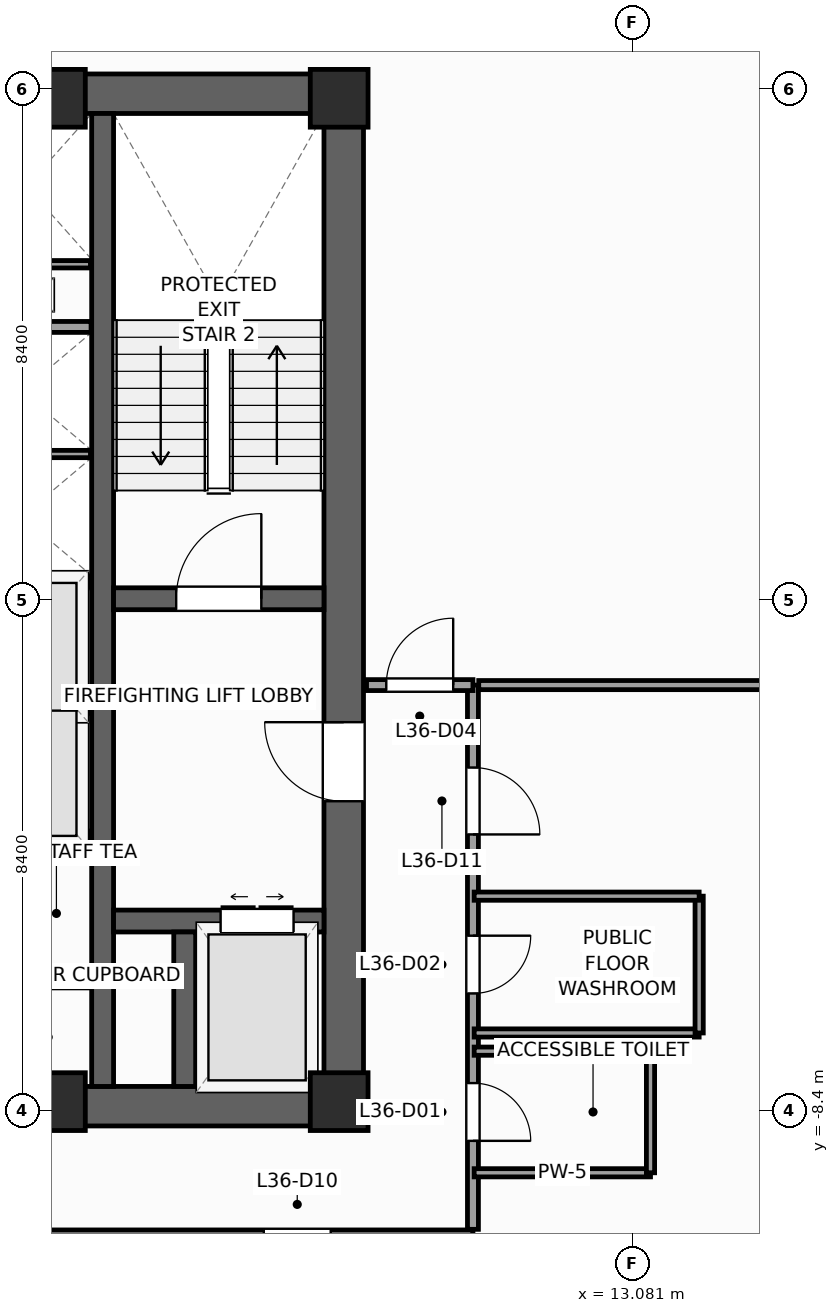
"""IFC4 building model, lengths in metres.
Left out: names, types, materials, properties, quantities, classifications, styles, units other than length and angle.
Written with IfcOpenShell. Run it as: python <this file> out.ifc"""

import sys

from ifc_helpers import new_model, si_unit, direction, frame, frame_2d, origin, origin_2d, place, context, subcontext, project, spatial, rectangle, extrude, source, transform, mapped, element, fill, save


model = new_model("IFC4")
c1 = context("Model", 3, precision=1e-05, world=origin(), true_north=direction((0.0, 1.0)))
c2 = subcontext(c1, "Body", "Model", "MODEL_VIEW")
j1 = project(units=[si_unit("LENGTHUNIT", "METRE"), si_unit("PLANEANGLEUNIT", "RADIAN")], contexts=[c1])
p1 = place(None, origin())
s1 = spatial("IfcSite", under=j1, at=p1, CompositionType="ELEMENT")
p2 = place(p1, origin())
s2 = spatial("IfcBuilding", under=s1, at=p2, CompositionType="ELEMENT")
p3 = place(p2, frame((0.0, 0.0, 152.4)))
s3 = spatial("IfcBuildingStorey", under=s2, at=p3, CompositionType="ELEMENT", Elevation=152.4)
p4 = place(p3, frame((-8.65, -8.325, 0.0), z_axis=(0.0, 0.0, 1.0), x_axis=(1.0, 0.0, 0.0)))
e1 = element("IfcWall", 1, at=p4, inside=s3, PredefinedType="SHEAR", context=c2, shape_type="SweptSolid", body=[
    extrude(rectangle(XDim=17.3, YDim=0.65, at=frame_2d((8.65, 0.0))), origin(), (0.0, 0.0, 1.0), 4.0),
])
p5 = place(p4, frame((8.0, 0.0, 0.0)))
e2 = element("IfcOpeningElement", 2, at=p5, cuts=e1, PredefinedType="OPENING", context=c2, shape_type="SweptSolid", body=[
    extrude(rectangle(XDim=1.3, YDim=2.2, at=frame_2d((0.65, 1.1))), frame((0.0, 0.335, 0.0), z_axis=(0.0, -1.0, 0.0), x_axis=(1.0, 0.0, 0.0)), (0.0, 0.0, 1.0), 0.67),
])
p6 = place(p3, frame((-8.65, 8.325, 0.0), z_axis=(0.0, 0.0, 1.0), x_axis=(1.0, 0.0, 0.0)))
e3 = element("IfcWall", 3, at=p6, inside=s3, PredefinedType="SHEAR", context=c2, shape_type="SweptSolid", body=[
    extrude(rectangle(XDim=17.3, YDim=0.65, at=frame_2d((8.65, 0.0))), origin(), (0.0, 0.0, 1.0), 4.0),
])
p7 = place(p3, frame((8.325, -8.0, 0.0), z_axis=(0.0, 0.0, 1.0), x_axis=(0.0, 1.0, 0.0)))
e4 = element("IfcWall", 4, at=p7, inside=s3, PredefinedType="SHEAR", context=c2, shape_type="SweptSolid", body=[
    extrude(rectangle(XDim=16.0, YDim=0.65, at=frame_2d((8.0, 0.0))), origin(), (0.0, 0.0, 1.0), 4.0),
])
p8 = place(p7, frame((4.69, 0.0, 0.0)))
e5 = element("IfcOpeningElement", 5, at=p8, cuts=e4, PredefinedType="OPENING", context=c2, shape_type="SweptSolid", body=[
    extrude(rectangle(XDim=1.3, YDim=2.2, at=frame_2d((0.65, 1.1))), frame((0.0, 0.335, 0.0), z_axis=(0.0, -1.0, 0.0), x_axis=(1.0, 0.0, 0.0)), (0.0, 0.0, 1.0), 0.67),
])
p9 = place(p3, frame((4.36, -8.0, 0.0), z_axis=(0.0, 0.0, 1.0), x_axis=(0.0, 1.0, 0.0)))
e6 = element("IfcWall", 6, at=p9, inside=s3, PredefinedType="SHEAR", context=c2, shape_type="SweptSolid", body=[
    extrude(rectangle(XDim=16.0, YDim=0.36, at=frame_2d((8.0, 0.0))), origin(), (0.0, 0.0, 1.0), 4.0),
])
p10 = place(p3, frame((4.54, 0.02, 0.0), z_axis=(0.0, 0.0, 1.0), x_axis=(1.0, 0.0, 0.0)))
e7 = element("IfcWall", 7, at=p10, inside=s3, PredefinedType="SHEAR", context=c2, shape_type="SweptSolid", body=[
    extrude(rectangle(XDim=3.46, YDim=0.36, at=frame_2d((1.73, 0.0))), origin(), (0.0, 0.0, 1.0), 4.0),
])
p11 = place(p10, frame((1.03, 0.0, 0.0)))
e8 = element("IfcOpeningElement", 8, at=p11, cuts=e7, PredefinedType="OPENING", context=c2, shape_type="SweptSolid", body=[
    extrude(rectangle(XDim=1.4, YDim=2.2, at=frame_2d((0.7, 1.1))), frame((0.0, 0.19, 0.0), z_axis=(0.0, -1.0, 0.0), x_axis=(1.0, 0.0, 0.0)), (0.0, 0.0, 1.0), 0.38),
])
p12 = place(p3, frame((4.54, -5.28, 0.0), z_axis=(0.0, 0.0, 1.0), x_axis=(1.0, 0.0, 0.0)))
e9 = element("IfcWall", 9, at=p12, inside=s3, PredefinedType="SHEAR", context=c2, shape_type="SweptSolid", body=[
    extrude(rectangle(XDim=3.46, YDim=0.36, at=frame_2d((1.73, 0.0))), origin(), (0.0, 0.0, 1.0), 4.0),
])
p13 = place(p12, frame((1.76, 0.0, 0.0)))
e10 = element("IfcOpeningElement", 10, at=p13, cuts=e9, PredefinedType="OPENING", context=c2, shape_type="SweptSolid", body=[
    extrude(rectangle(XDim=1.2, YDim=2.25, at=frame_2d((0.6, 1.125))), frame((0.0, 0.19, 0.0), z_axis=(0.0, -1.0, 0.0), x_axis=(1.0, 0.0, 0.0)), (0.0, 0.0, 1.0), 0.38),
])
p14 = place(p3, frame((5.71, -8.0, 0.0), z_axis=(0.0, 0.0, 1.0), x_axis=(0.0, 1.0, 0.0)))
e11 = element("IfcWall", 11, at=p14, inside=s3, PredefinedType="SHEAR", context=c2, shape_type="SweptSolid", body=[
    extrude(rectangle(XDim=2.54, YDim=0.36, at=frame_2d((1.27, 0.0))), origin(), (0.0, 0.0, 1.0), 4.0),
])
m1 = source(origin(), c2, "Body", "SweptSolid", [
    extrude(rectangle(XDim=0.95, YDim=0.95, at=origin_2d()), origin(), (0.0, 0.0, 1.0), 4.0),
])
for number, where, z_axis, x_axis in (
    (12, (8.25, -8.25, 0.0), (0.0, 0.0, 1.0), (1.0, 0.0, 0.0)),
    (13, (8.25, 8.25, 0.0), (0.0, 0.0, 1.0), (1.0, 0.0, 0.0)),
    (14, (3.6, -8.25, 0.0), (0.0, 0.0, 1.0), (1.0, 0.0, 0.0)),
    (15, (3.6, 8.25, 0.0), (0.0, 0.0, 1.0), (1.0, 0.0, 0.0)),
):
    element("IfcColumn", number, at=place(p3, frame(where, z_axis=z_axis, x_axis=x_axis)), inside=s3, PredefinedType="PILASTER", context=c2, shape_type="MappedRepresentation", body=[
        mapped(m1, transform((0.0, 0.0, 0.0), scale=1.0)),
    ])
p15 = place(p3, frame((-2.972, -32.558, 0.0), z_axis=(0.0, 0.0, 1.0), x_axis=(0.829036218961, 0.559194910251, 0.0)))
e16 = element("IfcWall", 16, at=p15, inside=s3, PredefinedType="STANDARD", context=c2, shape_type="SweptSolid", body=[
    extrude(rectangle(XDim=41.34, YDim=0.34, at=frame_2d((20.67, 0.0))), origin(), (0.0, 0.0, 1.0), 3.04),
])
p16 = place(p15, frame((14.545, 0.0, 0.0)))
e17 = element("IfcOpeningElement", 17, at=p16, cuts=e16, PredefinedType="OPENING", context=c2, shape_type="SweptSolid", body=[
    extrude(rectangle(XDim=1.05, YDim=2.25, at=frame_2d((0.525, 1.125))), frame((0.0, 0.18, 0.0), z_axis=(0.0, -1.0, 0.0), x_axis=(1.0, 0.0, 0.0)), (0.0, 0.0, 1.0), 0.36),
])
p17 = place(p15, frame((4.261, 0.0, 0.56)))
e18 = element("IfcOpeningElement", 18, at=p17, cuts=e16, PredefinedType="OPENING", context=c2, shape_type="SweptSolid", body=[
    extrude(rectangle(XDim=1.4, YDim=2.4, at=frame_2d((0.7, 1.2))), frame((0.0, 0.18, 0.0), z_axis=(0.0, -1.0, 0.0), x_axis=(1.0, 0.0, 0.0)), (0.0, 0.0, 1.0), 0.36),
])
p18 = place(p15, frame((11.064, 0.0, 0.61)))
e19 = element("IfcOpeningElement", 19, at=p18, cuts=e16, PredefinedType="OPENING", context=c2, shape_type="SweptSolid", body=[
    extrude(rectangle(XDim=1.85, YDim=2.35, at=frame_2d((0.925, 1.175))), frame((0.0, 0.18, 0.0), z_axis=(0.0, -1.0, 0.0), x_axis=(1.0, 0.0, 0.0)), (0.0, 0.0, 1.0), 0.36),
])
p19 = place(p15, frame((18.168, 0.0, 0.61)))
e20 = element("IfcOpeningElement", 20, at=p19, cuts=e16, PredefinedType="OPENING", context=c2, shape_type="SweptSolid", body=[
    extrude(rectangle(XDim=1.85, YDim=2.35, at=frame_2d((0.925, 1.175))), frame((0.0, 0.18, 0.0), z_axis=(0.0, -1.0, 0.0), x_axis=(1.0, 0.0, 0.0)), (0.0, 0.0, 1.0), 0.36),
])
p20 = place(p15, frame((27.186, 0.0, 0.61)))
e21 = element("IfcOpeningElement", 21, at=p20, cuts=e16, PredefinedType="OPENING", context=c2, shape_type="SweptSolid", body=[
    extrude(rectangle(XDim=1.85, YDim=2.35, at=frame_2d((0.925, 1.175))), frame((0.0, 0.18, 0.0), z_axis=(0.0, -1.0, 0.0), x_axis=(1.0, 0.0, 0.0)), (0.0, 0.0, 1.0), 0.36),
])
p21 = place(p15, frame((34.852, 0.0, 0.56)))
e22 = element("IfcOpeningElement", 22, at=p21, cuts=e16, PredefinedType="OPENING", context=c2, shape_type="SweptSolid", body=[
    extrude(rectangle(XDim=1.4, YDim=2.4, at=frame_2d((0.7, 1.2))), frame((0.0, 0.18, 0.0), z_axis=(0.0, -1.0, 0.0), x_axis=(1.0, 0.0, 0.0)), (0.0, 0.0, 1.0), 0.36),
])
p22 = place(p3, frame((32.558, -2.972, 0.0), z_axis=(0.0, 0.0, 1.0), x_axis=(-0.559194910251, 0.829036218961, 0.0)))
e23 = element("IfcWall", 23, at=p22, inside=s3, PredefinedType="STANDARD", context=c2, shape_type="SweptSolid", body=[
    extrude(rectangle(XDim=41.34, YDim=0.34, at=frame_2d((20.67, 0.0))), origin(), (0.0, 0.0, 1.0), 3.04),
])
p23 = place(p22, frame((4.261, 0.0, 0.56)))
e24 = element("IfcOpeningElement", 24, at=p23, cuts=e23, PredefinedType="OPENING", context=c2, shape_type="SweptSolid", body=[
    extrude(rectangle(XDim=1.4, YDim=2.4, at=frame_2d((0.7, 1.2))), frame((0.0, 0.18, 0.0), z_axis=(0.0, -1.0, 0.0), x_axis=(1.0, 0.0, 0.0)), (0.0, 0.0, 1.0), 0.36),
])
p24 = place(p22, frame((11.064, 0.0, 0.61)))
e25 = element("IfcOpeningElement", 25, at=p24, cuts=e23, PredefinedType="OPENING", context=c2, shape_type="SweptSolid", body=[
    extrude(rectangle(XDim=1.85, YDim=2.35, at=frame_2d((0.925, 1.175))), frame((0.0, 0.18, 0.0), z_axis=(0.0, -1.0, 0.0), x_axis=(1.0, 0.0, 0.0)), (0.0, 0.0, 1.0), 0.36),
])
p25 = place(p22, frame((18.168, 0.0, 0.61)))
e26 = element("IfcOpeningElement", 26, at=p25, cuts=e23, PredefinedType="OPENING", context=c2, shape_type="SweptSolid", body=[
    extrude(rectangle(XDim=1.85, YDim=2.35, at=frame_2d((0.925, 1.175))), frame((0.0, 0.18, 0.0), z_axis=(0.0, -1.0, 0.0), x_axis=(1.0, 0.0, 0.0)), (0.0, 0.0, 1.0), 0.36),
])
p26 = place(p22, frame((27.186, 0.0, 0.61)))
e27 = element("IfcOpeningElement", 27, at=p26, cuts=e23, PredefinedType="OPENING", context=c2, shape_type="SweptSolid", body=[
    extrude(rectangle(XDim=1.85, YDim=2.35, at=frame_2d((0.925, 1.175))), frame((0.0, 0.18, 0.0), z_axis=(0.0, -1.0, 0.0), x_axis=(1.0, 0.0, 0.0)), (0.0, 0.0, 1.0), 0.36),
])
p27 = place(p22, frame((34.852, 0.0, 0.56)))
e28 = element("IfcOpeningElement", 28, at=p27, cuts=e23, PredefinedType="OPENING", context=c2, shape_type="SweptSolid", body=[
    extrude(rectangle(XDim=1.4, YDim=2.4, at=frame_2d((0.7, 1.2))), frame((0.0, 0.18, 0.0), z_axis=(0.0, -1.0, 0.0), x_axis=(1.0, 0.0, 0.0)), (0.0, 0.0, 1.0), 0.36),
])
for number, where, z_axis, x_axis in (
    (29, (1.89, -3.9, 0.0), (0.0, 0.0, 1.0), (1.0, 0.0, 0.0)),
    (30, (1.89, 0.3, 0.0), (0.0, 0.0, 1.0), (1.0, 0.0, 0.0)),
    (31, (1.89, 4.49, 0.0), (0.0, 0.0, 1.0), (1.0, 0.0, 0.0)),
):
    element("IfcWall", number, at=place(p3, frame(where, z_axis=z_axis, x_axis=x_axis)), inside=s3, PredefinedType="PARTITIONING", context=c2, shape_type="SweptSolid", body=[
        extrude(rectangle(XDim=2.28, YDim=0.18, at=frame_2d((1.14, 0.0))), origin(), (0.0, 0.0, 1.0), 3.74),
    ])
for number, where, z_axis, x_axis in (
    (32, (1.9, -1.8, 0.0), (0.0, 0.0, 1.0), (1.0, 0.0, 0.0)),
    (33, (1.9, 2.4, 0.0), (0.0, 0.0, 1.0), (1.0, 0.0, 0.0)),
):
    element("IfcWall", number, at=place(p3, frame(where, z_axis=z_axis, x_axis=x_axis)), inside=s3, PredefinedType="PARTITIONING", context=c2, shape_type="SweptSolid", body=[
        extrude(rectangle(XDim=2.26, YDim=0.12, at=frame_2d((1.13, 0.0))), origin(), (0.0, 0.0, 1.0), 3.74),
    ])
p28 = place(p3, frame((1.89, -6.3, 0.0), z_axis=(0.0, 0.0, 1.0), x_axis=(1.0, 0.0, 0.0)))
e34 = element("IfcWall", 34, at=p28, inside=s3, PredefinedType="PARTITIONING", context=c2, shape_type="SweptSolid", body=[
    extrude(rectangle(XDim=2.28, YDim=0.16, at=frame_2d((1.14, 0.0))), origin(), (0.0, 0.0, 1.0), 3.74),
])
p29 = place(p3, frame((2.06, 5.52, 0.0), z_axis=(0.0, 0.0, 1.0), x_axis=(1.0, 0.0, 0.0)))
e35 = element("IfcWall", 35, at=p29, inside=s3, PredefinedType="PARTITIONING", context=c2, shape_type="SweptSolid", body=[
    extrude(rectangle(XDim=2.1, YDim=0.12, at=frame_2d((1.05, 0.0))), origin(), (0.0, 0.0, 1.0), 3.74),
])
p30 = place(p3, frame((-10.45, -10.45, 0.0), z_axis=(0.0, 0.0, 1.0), x_axis=(1.0, 0.0, 0.0)))
e36 = element("IfcWall", 36, at=p30, inside=s3, PredefinedType="PARTITIONING", context=c2, shape_type="SweptSolid", body=[
    extrude(rectangle(XDim=20.9, YDim=0.18, at=frame_2d((10.45, 0.0))), origin(), (0.0, 0.0, 1.0), 3.74),
])
p31 = place(p30, frame((2.339, 0.0, 0.0)))
e37 = element("IfcOpeningElement", 37, at=p31, cuts=e36, PredefinedType="OPENING", context=c2, shape_type="SweptSolid", body=[
    extrude(rectangle(XDim=1.1, YDim=2.2, at=frame_2d((0.55, 1.1))), frame((0.0, 0.1, 0.0), z_axis=(0.0, -1.0, 0.0), x_axis=(1.0, 0.0, 0.0)), (0.0, 0.0, 1.0), 0.2),
])
p32 = place(p30, frame((7.4, 0.0, 0.0)))
e38 = element("IfcOpeningElement", 38, at=p32, cuts=e36, PredefinedType="OPENING", context=c2, shape_type="SweptSolid", body=[
    extrude(rectangle(XDim=1.1, YDim=2.2, at=frame_2d((0.55, 1.1))), frame((0.0, 0.1, 0.0), z_axis=(0.0, -1.0, 0.0), x_axis=(1.0, 0.0, 0.0)), (0.0, 0.0, 1.0), 0.2),
])
p33 = place(p30, frame((12.4, 0.0, 0.0)))
e39 = element("IfcOpeningElement", 39, at=p33, cuts=e36, PredefinedType="OPENING", context=c2, shape_type="SweptSolid", body=[
    extrude(rectangle(XDim=1.1, YDim=2.2, at=frame_2d((0.55, 1.1))), frame((0.0, 0.1, 0.0), z_axis=(0.0, -1.0, 0.0), x_axis=(1.0, 0.0, 0.0)), (0.0, 0.0, 1.0), 0.2),
])
p34 = place(p30, frame((17.46, 0.0, 0.0)))
e40 = element("IfcOpeningElement", 40, at=p34, cuts=e36, PredefinedType="OPENING", context=c2, shape_type="SweptSolid", body=[
    extrude(rectangle(XDim=1.1, YDim=2.2, at=frame_2d((0.55, 1.1))), frame((0.0, 0.1, 0.0), z_axis=(0.0, -1.0, 0.0), x_axis=(1.0, 0.0, 0.0)), (0.0, 0.0, 1.0), 0.2),
])
p35 = place(p3, frame((10.45, -10.35, 0.0), z_axis=(0.0, 0.0, 1.0), x_axis=(0.0, 1.0, 0.0)))
e41 = element("IfcWall", 41, at=p35, inside=s3, PredefinedType="PARTITIONING", context=c2, shape_type="SweptSolid", body=[
    extrude(rectangle(XDim=8.95, YDim=0.18, at=frame_2d((4.475, 0.0))), origin(), (0.0, 0.0, 1.0), 3.74),
])
p36 = place(p35, frame((1.455, 0.0, 0.0)))
e42 = element("IfcOpeningElement", 42, at=p36, cuts=e41, PredefinedType="OPENING", context=c2, shape_type="SweptSolid", body=[
    extrude(rectangle(XDim=0.95, YDim=2.1, at=frame_2d((0.475, 1.05))), frame((0.0, 0.1, 0.0), z_axis=(0.0, -1.0, 0.0), x_axis=(1.0, 0.0, 0.0)), (0.0, 0.0, 1.0), 0.2),
])
p37 = place(p35, frame((3.879, 0.0, 0.0)))
e43 = element("IfcOpeningElement", 43, at=p37, cuts=e41, PredefinedType="OPENING", context=c2, shape_type="SweptSolid", body=[
    extrude(rectangle(XDim=0.95, YDim=2.1, at=frame_2d((0.475, 1.05))), frame((0.0, 0.1, 0.0), z_axis=(0.0, -1.0, 0.0), x_axis=(1.0, 0.0, 0.0)), (0.0, 0.0, 1.0), 0.2),
])
p38 = place(p35, frame((6.494, 0.0, 0.0)))
e44 = element("IfcOpeningElement", 44, at=p38, cuts=e41, PredefinedType="OPENING", context=c2, shape_type="SweptSolid", body=[
    extrude(rectangle(XDim=1.1, YDim=2.2, at=frame_2d((0.55, 1.1))), frame((0.0, 0.1, 0.0), z_axis=(0.0, -1.0, 0.0), x_axis=(1.0, 0.0, 0.0)), (0.0, 0.0, 1.0), 0.2),
])
p39 = place(p3, frame((8.7, -1.4, 0.0), z_axis=(0.0, 0.0, 1.0), x_axis=(1.0, 0.0, 0.0)))
e45 = element("IfcWall", 45, at=p39, inside=s3, PredefinedType="PARTITIONING", context=c2, shape_type="SweptSolid", body=[
    extrude(rectangle(XDim=1.75, YDim=0.18, at=frame_2d((0.875, 0.0))), origin(), (0.0, 0.0, 1.0), 3.74),
])
p40 = place(p39, frame((0.325, 0.0, 0.0)))
e46 = element("IfcOpeningElement", 46, at=p40, cuts=e45, PredefinedType="OPENING", context=c2, shape_type="SweptSolid", body=[
    extrude(rectangle(XDim=1.1, YDim=2.2, at=frame_2d((0.55, 1.1))), frame((0.0, 0.1, 0.0), z_axis=(0.0, -1.0, 0.0), x_axis=(1.0, 0.0, 0.0)), (0.0, 0.0, 1.0), 0.2),
])
p41 = place(p3, frame((10.545, -1.4, 0.0), z_axis=(0.0, 0.0, 1.0), x_axis=(1.0, 0.0, 0.0)))
e47 = element("IfcWall", 47, at=p41, inside=s3, PredefinedType="PARTITIONING", context=c2, shape_type="SweptSolid", body=[
    extrude(rectangle(XDim=20.826, YDim=0.15, at=frame_2d((10.413, 0.0))), origin(), (0.0, 0.0, 1.0), 3.74),
])
p42 = place(p3, frame((10.47, -9.42, 0.0), z_axis=(0.0, 0.0, 1.0), x_axis=(1.0, 0.0, 0.0)))
e48 = element("IfcWall", 48, at=p42, inside=s3, PredefinedType="PARTITIONING", context=c2, shape_type="SweptSolid", body=[
    extrude(rectangle(XDim=2.9, YDim=0.135, at=frame_2d((1.45, 0.0))), origin(), (0.0, 0.0, 1.0), 3.74),
])
p43 = place(p3, frame((13.37, -9.42, 0.0), z_axis=(0.0, 0.0, 1.0), x_axis=(0.0, 1.0, 0.0)))
e49 = element("IfcWall", 49, at=p43, inside=s3, PredefinedType="PARTITIONING", context=c2, shape_type="SweptSolid", body=[
    extrude(rectangle(XDim=2.0, YDim=0.135, at=frame_2d((1.0, 0.0))), origin(), (0.0, 0.0, 1.0), 2.84),
])
p44 = place(p3, frame((10.47, -7.42, 0.0), z_axis=(0.0, 0.0, 1.0), x_axis=(1.0, 0.0, 0.0)))
e50 = element("IfcWall", 50, at=p44, inside=s3, PredefinedType="PARTITIONING", context=c2, shape_type="SweptSolid", body=[
    extrude(rectangle(XDim=2.9, YDim=0.135, at=frame_2d((1.45, 0.0))), origin(), (0.0, 0.0, 1.0), 3.74),
])
p45 = place(p3, frame((10.47, -7.121, 0.0), z_axis=(0.0, 0.0, 1.0), x_axis=(1.0, 0.0, 0.0)))
e51 = element("IfcWall", 51, at=p45, inside=s3, PredefinedType="PARTITIONING", context=c2, shape_type="SweptSolid", body=[
    extrude(rectangle(XDim=3.7, YDim=0.135, at=frame_2d((1.85, 0.0))), origin(), (0.0, 0.0, 1.0), 3.74),
])
p46 = place(p3, frame((14.17, -7.121, 0.0), z_axis=(0.0, 0.0, 1.0), x_axis=(0.0, 1.0, 0.0)))
e52 = element("IfcWall", 52, at=p46, inside=s3, PredefinedType="PARTITIONING", context=c2, shape_type="SweptSolid", body=[
    extrude(rectangle(XDim=2.25, YDim=0.135, at=frame_2d((1.125, 0.0))), origin(), (0.0, 0.0, 1.0), 3.74),
])
p47 = place(p3, frame((10.47, -4.871, 0.0), z_axis=(0.0, 0.0, 1.0), x_axis=(1.0, 0.0, 0.0)))
e53 = element("IfcWall", 53, at=p47, inside=s3, PredefinedType="PARTITIONING", context=c2, shape_type="SweptSolid", body=[
    extrude(rectangle(XDim=3.7, YDim=0.135, at=frame_2d((1.85, 0.0))), origin(), (0.0, 0.0, 1.0), 3.74),
])
m2 = source(origin(), c2, "Body", "SweptSolid", [
    extrude(rectangle(XDim=1.4, YDim=2.2, at=frame_2d((0.7, 1.1))), frame((0.0, 0.025, 0.0), z_axis=(0.0, -1.0, 0.0), x_axis=(1.0, 0.0, 0.0)), (0.0, 0.0, 1.0), 0.05),
])
p48 = place(p11, origin())
e54 = element("IfcDoor", 54, at=p48, inside=s3, OperationType="SINGLE_SWING_RIGHT", PredefinedType="DOOR", context=c2, shape_type="MappedRepresentation", body=[
    mapped(m2, transform((0.0, 0.0, 0.0), scale=1.0)),
])
fill(e8, e54)
m3 = source(origin(), c2, "Body", "SweptSolid", [
    extrude(rectangle(XDim=1.3, YDim=2.2, at=frame_2d((0.65, 1.1))), frame((0.0, 0.025, 0.0), z_axis=(0.0, -1.0, 0.0), x_axis=(1.0, 0.0, 0.0)), (0.0, 0.0, 1.0), 0.05),
])
p49 = place(p8, origin())
e55 = element("IfcDoor", 55, at=p49, inside=s3, OperationType="SINGLE_SWING_RIGHT", PredefinedType="DOOR", context=c2, shape_type="MappedRepresentation", body=[
    mapped(m3, transform((0.0, 0.0, 0.0), scale=1.0)),
])
fill(e5, e55)
m4 = source(origin(), c2, "Body", "SweptSolid", [
    extrude(rectangle(XDim=1.2, YDim=2.25, at=frame_2d((0.6, 1.125))), frame((0.0, 0.025, 0.0), z_axis=(0.0, -1.0, 0.0), x_axis=(1.0, 0.0, 0.0)), (0.0, 0.0, 1.0), 0.05),
])
p50 = place(p13, origin())
e56 = element("IfcDoor", 56, at=p50, inside=s3, OperationType="DOUBLE_DOOR_SLIDING", PredefinedType="DOOR", context=c2, shape_type="MappedRepresentation", body=[
    mapped(m4, transform((0.0, 0.0, 0.0), scale=1.0)),
])
fill(e10, e56)
m5 = source(origin(), c2, "Body", "SweptSolid", [
    extrude(rectangle(XDim=0.95, YDim=2.1, at=frame_2d((0.475, 1.05))), frame((0.0, 0.025, 0.0), z_axis=(0.0, -1.0, 0.0), x_axis=(1.0, 0.0, 0.0)), (0.0, 0.0, 1.0), 0.05),
])
p51 = place(p36, frame((0.95, 0.0, 0.0), z_axis=(0.0, 0.0, 1.0), x_axis=(-1.0, 0.0, 0.0)))
e57 = element("IfcDoor", 57, at=p51, inside=s3, OperationType="SINGLE_SWING_LEFT", PredefinedType="DOOR", context=c2, shape_type="MappedRepresentation", body=[
    mapped(m5, transform((0.0, 0.0, 0.0), scale=1.0)),
])
fill(e42, e57)
p52 = place(p37, frame((0.95, 0.0, 0.0), z_axis=(0.0, 0.0, 1.0), x_axis=(-1.0, 0.0, 0.0)))
e58 = element("IfcDoor", 58, at=p52, inside=s3, OperationType="SINGLE_SWING_RIGHT", PredefinedType="DOOR", context=c2, shape_type="MappedRepresentation", body=[
    mapped(m5, transform((0.0, 0.0, 0.0), scale=1.0)),
])
fill(e43, e58)
m6 = source(origin(), c2, "Body", "SweptSolid", [
    extrude(rectangle(XDim=1.1, YDim=2.2, at=frame_2d((0.55, 1.1))), frame((0.0, 0.025, 0.0), z_axis=(0.0, -1.0, 0.0), x_axis=(1.0, 0.0, 0.0)), (0.0, 0.0, 1.0), 0.05),
])
p53 = place(p40, origin())
e59 = element("IfcDoor", 59, at=p53, inside=s3, OperationType="SINGLE_SWING_RIGHT", PredefinedType="DOOR", context=c2, shape_type="MappedRepresentation", body=[
    mapped(m6, transform((0.0, 0.0, 0.0), scale=1.0)),
])
fill(e46, e59)
p54 = place(p38, frame((1.1, 0.0, 0.0), z_axis=(0.0, 0.0, 1.0), x_axis=(-1.0, 0.0, 0.0)))
e60 = element("IfcDoor", 60, at=p54, inside=s3, OperationType="SINGLE_SWING_LEFT", PredefinedType="DOOR", context=c2, shape_type="MappedRepresentation", body=[
    mapped(m6, transform((0.0, 0.0, 0.0), scale=1.0)),
])
fill(e44, e60)
save(model, sys.argv[1])
